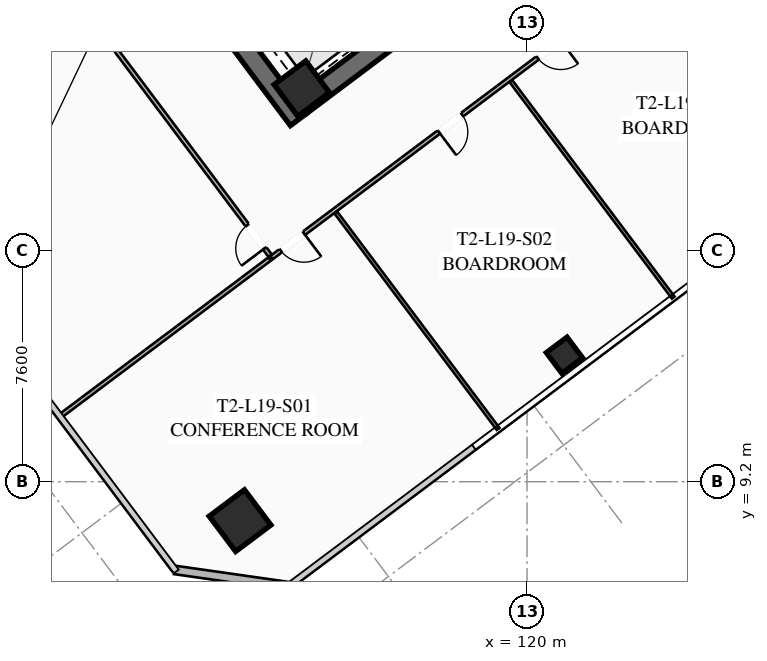
"""IFC4 building model, lengths in metres.
Left out: names, types, materials, properties, quantities, classifications, styles, units other than length and angle.
Written with IfcOpenShell. Run it as: python <this file> out.ifc"""

import sys

from ifc_helpers import new_model, si_unit, direction, frame, frame_2d, origin, origin_2d, place, context, subcontext, project, spatial, rectangle, hollow_rectangle, extrude, element, fill, save


model = new_model("IFC4")
c1 = context("Model", 3, precision=1e-05, world=origin(), true_north=direction((0.0, 1.0)))
c2 = subcontext(c1, "Body", "Model", "MODEL_VIEW")
j1 = project(units=[si_unit("LENGTHUNIT", "METRE"), si_unit("PLANEANGLEUNIT", "RADIAN")], contexts=[c1])
p1 = place(None, origin())
s1 = spatial("IfcSite", under=j1, at=p1, CompositionType="ELEMENT")
p2 = place(p1, origin())
s2 = spatial("IfcBuilding", under=s1, at=p2, CompositionType="ELEMENT")
p3 = place(p2, frame((0.0, 0.0, 74.3)))
s3 = spatial("IfcBuildingStorey", under=s2, at=p3, CompositionType="ELEMENT", Elevation=74.3)
p4 = place(p3, frame((112.476, 21.107, 0.0), z_axis=(0.0, 0.0, 1.0), x_axis=(-0.600005007985, 0.799996243986, 0.0)))
e1 = element("IfcWall", 1, at=p4, inside=s3, PredefinedType="SHEAR", context=c2, shape_type="SweptSolid", body=[
    extrude(rectangle(XDim=15.6, YDim=0.65, at=frame_2d((7.8, 0.0))), origin(), (0.0, 0.0, 1.0), 3.55),
])
p5 = place(p3, frame((124.429, 30.478, 0.0), z_axis=(0.0, 0.0, 1.0), x_axis=(-0.799998028465, -0.600002628705, 0.0)))
e2 = element("IfcWall", 2, at=p5, inside=s3, PredefinedType="SHEAR", context=c2, shape_type="SweptSolid", body=[
    extrude(rectangle(XDim=14.86, YDim=0.65, at=frame_2d((7.43, 0.0))), origin(), (0.0, 0.0, 1.0), 3.55),
])
p6 = place(p5, frame((9.13, 0.0, 0.0)))
e3 = element("IfcOpeningElement", 3, at=p6, cuts=e2, PredefinedType="OPENING", context=c2, shape_type="SweptSolid", body=[
    extrude(rectangle(XDim=1.25, YDim=2.25, at=frame_2d((0.625, 1.125))), frame((0.0, 0.335, 0.0), z_axis=(0.0, -1.0, 0.0), x_axis=(1.0, 0.0, 0.0)), (0.0, 0.0, 1.0), 0.67),
])
p7 = place(p5, frame((4.08, 0.0, 0.0)))
e4 = element("IfcOpeningElement", 4, at=p7, cuts=e2, PredefinedType="OPENING", context=c2, shape_type="SweptSolid", body=[
    extrude(rectangle(XDim=1.25, YDim=2.25, at=frame_2d((0.625, 1.125))), frame((0.0, 0.335, 0.0), z_axis=(0.0, -1.0, 0.0), x_axis=(1.0, 0.0, 0.0)), (0.0, 0.0, 1.0), 0.67),
])
p8 = place(p3, frame((112.59, 22.13, 0.0), z_axis=(0.0, 0.0, 1.0), x_axis=(0.799999996291, 0.600000004945, 0.0)))
e5 = element("IfcColumn", 5, at=p8, inside=s3, PredefinedType="COLUMN", context=c2, shape_type="SweptSolid", body=[
    extrude(hollow_rectangle(XDim=1.3, YDim=1.3, WallThickness=0.05, at=origin_2d()), origin(), (0.0, 0.0, 1.0), 3.35),
])
p9 = place(p3, frame((110.56, 7.92, 0.0), z_axis=(0.0, 0.0, 1.0), x_axis=(0.799999996291, 0.600000004945, 0.0)))
e6 = element("IfcColumn", 6, at=p9, inside=s3, PredefinedType="COLUMN", context=c2, shape_type="SweptSolid", body=[
    extrude(hollow_rectangle(XDim=1.45, YDim=1.45, WallThickness=0.055, at=origin_2d()), origin(), (0.0, 0.0, 1.0), 3.35),
])
p10 = place(p3, frame((121.23, 13.36, 0.0), z_axis=(0.0, 0.0, 1.0), x_axis=(0.799999996291, 0.600000004945, 0.0)))
e7 = element("IfcColumn", 7, at=p10, inside=s3, PredefinedType="COLUMN", context=c2, shape_type="SweptSolid", body=[
    extrude(hollow_rectangle(XDim=0.85, YDim=0.85, WallThickness=0.035, at=origin_2d()), origin(), (0.0, 0.0, 1.0), 3.35),
])
p11 = place(p3, frame((112.18, 5.76, 0.0), z_axis=(0.0, 0.0, 1.0), x_axis=(-0.989948214866, 0.141430307517, 0.0)))
e8 = element("IfcWall", 8, at=p11, inside=s3, PredefinedType="SOLIDWALL", context=c2, shape_type="SweptSolid", body=[
    extrude(rectangle(XDim=3.818, YDim=0.28, at=frame_2d((1.909, 0.0))), origin(), (0.0, 0.0, 1.0), 3.35),
])
p12 = place(p3, frame((134.18, 33.51, 0.0), z_axis=(0.0, 0.0, 1.0), x_axis=(-0.8, -0.6, 0.0)))
e9 = element("IfcWall", 9, at=p12, inside=s3, PredefinedType="PARTITIONING", context=c2, shape_type="SweptSolid", body=[
    extrude(rectangle(XDim=28.23, YDim=0.135, at=frame_2d((14.115, 0.0))), origin(), (0.0, 0.0, 1.0), 2.703),
])
p13 = place(p12, frame((26.9, 0.0, 0.0)))
e10 = element("IfcOpeningElement", 10, at=p13, cuts=e9, PredefinedType="OPENING", context=c2, shape_type="SweptSolid", body=[
    extrude(rectangle(XDim=0.95, YDim=2.05, at=frame_2d((0.475, 1.025))), frame((0.0, 0.077, 0.0), z_axis=(0.0, -1.0, 0.0), x_axis=(1.0, 0.0, 0.0)), (0.0, 0.0, 1.0), 0.155),
])
p14 = place(p12, frame((20.399, 0.0, 0.0)))
e11 = element("IfcOpeningElement", 11, at=p14, cuts=e9, PredefinedType="OPENING", context=c2, shape_type="SweptSolid", body=[
    extrude(rectangle(XDim=0.95, YDim=2.05, at=frame_2d((0.475, 1.025))), frame((0.0, 0.077, 0.0), z_axis=(0.0, -1.0, 0.0), x_axis=(1.0, 0.0, 0.0)), (0.0, 0.0, 1.0), 0.155),
])
p15 = place(p12, frame((16.339, 0.0, 0.0)))
e12 = element("IfcOpeningElement", 12, at=p15, cuts=e9, PredefinedType="OPENING", context=c2, shape_type="SweptSolid", body=[
    extrude(rectangle(XDim=0.95, YDim=2.05, at=frame_2d((0.475, 1.025))), frame((0.0, 0.077, 0.0), z_axis=(0.0, -1.0, 0.0), x_axis=(1.0, 0.0, 0.0)), (0.0, 0.0, 1.0), 0.155),
])
p16 = place(p12, frame((0.38, 0.0, 0.0)))
e13 = element("IfcOpeningElement", 13, at=p16, cuts=e9, PredefinedType="OPENING", context=c2, shape_type="SweptSolid", body=[
    extrude(rectangle(XDim=0.95, YDim=2.05, at=frame_2d((0.475, 1.025))), frame((0.0, 0.077, 0.0), z_axis=(0.0, -1.0, 0.0), x_axis=(1.0, 0.0, 0.0)), (0.0, 0.0, 1.0), 0.155),
])
for number, where, z_axis, x_axis in (
    (14, (119.048, 10.936, 0.0), (0.0, 0.0, 1.0), (-0.6, 0.8, 0.0)),
    (15, (124.808, 15.256, 0.0), (0.0, 0.0, 1.0), (-0.6, 0.8, 0.0)),
):
    element("IfcWall", number, at=place(p3, frame(where, z_axis=z_axis, x_axis=x_axis)), inside=s3, PredefinedType="PARTITIONING", context=c2, shape_type="SweptSolid", body=[
        extrude(rectangle(XDim=8.9, YDim=0.11, at=frame_2d((4.45, 0.0))), origin(), (0.0, 0.0, 1.0), 2.703),
    ])
p17 = place(p3, frame((111.548, 16.636, 0.0), z_axis=(0.0, 0.0, 1.0), x_axis=(-0.600003610192, 0.799997292343, 0.0)))
e16 = element("IfcWall", 16, at=p17, inside=s3, PredefinedType="PARTITIONING", context=c2, shape_type="SweptSolid", body=[
    extrude(rectangle(XDim=21.64, YDim=0.135, at=frame_2d((10.82, 0.0))), origin(), (0.0, 0.0, 1.0), 2.703),
])
p18 = place(p17, frame((0.3, 0.0, 0.0)))
e17 = element("IfcOpeningElement", 17, at=p18, cuts=e16, PredefinedType="OPENING", context=c2, shape_type="SweptSolid", body=[
    extrude(rectangle(XDim=0.95, YDim=2.05, at=frame_2d((0.475, 1.025))), frame((0.0, 0.077, 0.0), z_axis=(0.0, -1.0, 0.0), x_axis=(1.0, 0.0, 0.0)), (0.0, 0.0, 1.0), 0.155),
])
p19 = place(p3, frame((104.636, 11.352, 0.0), z_axis=(0.0, 0.0, 1.0), x_axis=(0.800006797429, 0.599990936654, 0.0)))
e18 = element("IfcWall", 18, at=p19, inside=s3, PredefinedType="PARTITIONING", context=c2, shape_type="SweptSolid", body=[
    extrude(rectangle(XDim=8.62, YDim=0.135, at=frame_2d((4.31, 0.0))), origin(), (0.0, 0.0, 1.0), 2.703),
])
p20 = place(p13, origin())
e19 = element("IfcDoor", 19, at=p20, inside=s3, OperationType="SINGLE_SWING_LEFT", PredefinedType="DOOR", context=c2, shape_type="SweptSolid", body=[
    extrude(rectangle(XDim=0.95, YDim=2.05, at=frame_2d((0.475, 1.025))), frame((0.0, 0.025, 0.0), z_axis=(0.0, -1.0, 0.0), x_axis=(1.0, 0.0, 0.0)), (0.0, 0.0, 1.0), 0.05),
])
fill(e10, e19)
p21 = place(p14, origin())
e20 = element("IfcDoor", 20, at=p21, inside=s3, OperationType="SINGLE_SWING_RIGHT", PredefinedType="DOOR", context=c2, shape_type="SweptSolid", body=[
    extrude(rectangle(XDim=0.95, YDim=2.05, at=frame_2d((0.475, 1.025))), frame((0.0, 0.025, 0.0), z_axis=(0.0, -1.0, 0.0), x_axis=(1.0, 0.0, 0.0)), (0.0, 0.0, 1.0), 0.05),
])
fill(e11, e20)
p22 = place(p15, origin())
e21 = element("IfcDoor", 21, at=p22, inside=s3, OperationType="SINGLE_SWING_LEFT", PredefinedType="DOOR", context=c2, shape_type="SweptSolid", body=[
    extrude(rectangle(XDim=0.95, YDim=2.05, at=frame_2d((0.475, 1.025))), frame((0.0, 0.025, 0.0), z_axis=(0.0, -1.0, 0.0), x_axis=(1.0, 0.0, 0.0)), (0.0, 0.0, 1.0), 0.05),
])
fill(e12, e21)
p23 = place(p18, origin())
e22 = element("IfcDoor", 22, at=p23, inside=s3, OperationType="SINGLE_SWING_LEFT", PredefinedType="DOOR", context=c2, shape_type="SweptSolid", body=[
    extrude(rectangle(XDim=0.95, YDim=2.05, at=frame_2d((0.475, 1.025))), frame((0.0, 0.025, 0.0), z_axis=(0.0, -1.0, 0.0), x_axis=(1.0, 0.0, 0.0)), (0.0, 0.0, 1.0), 0.05),
])
fill(e17, e22)
save(model, sys.argv[1])
